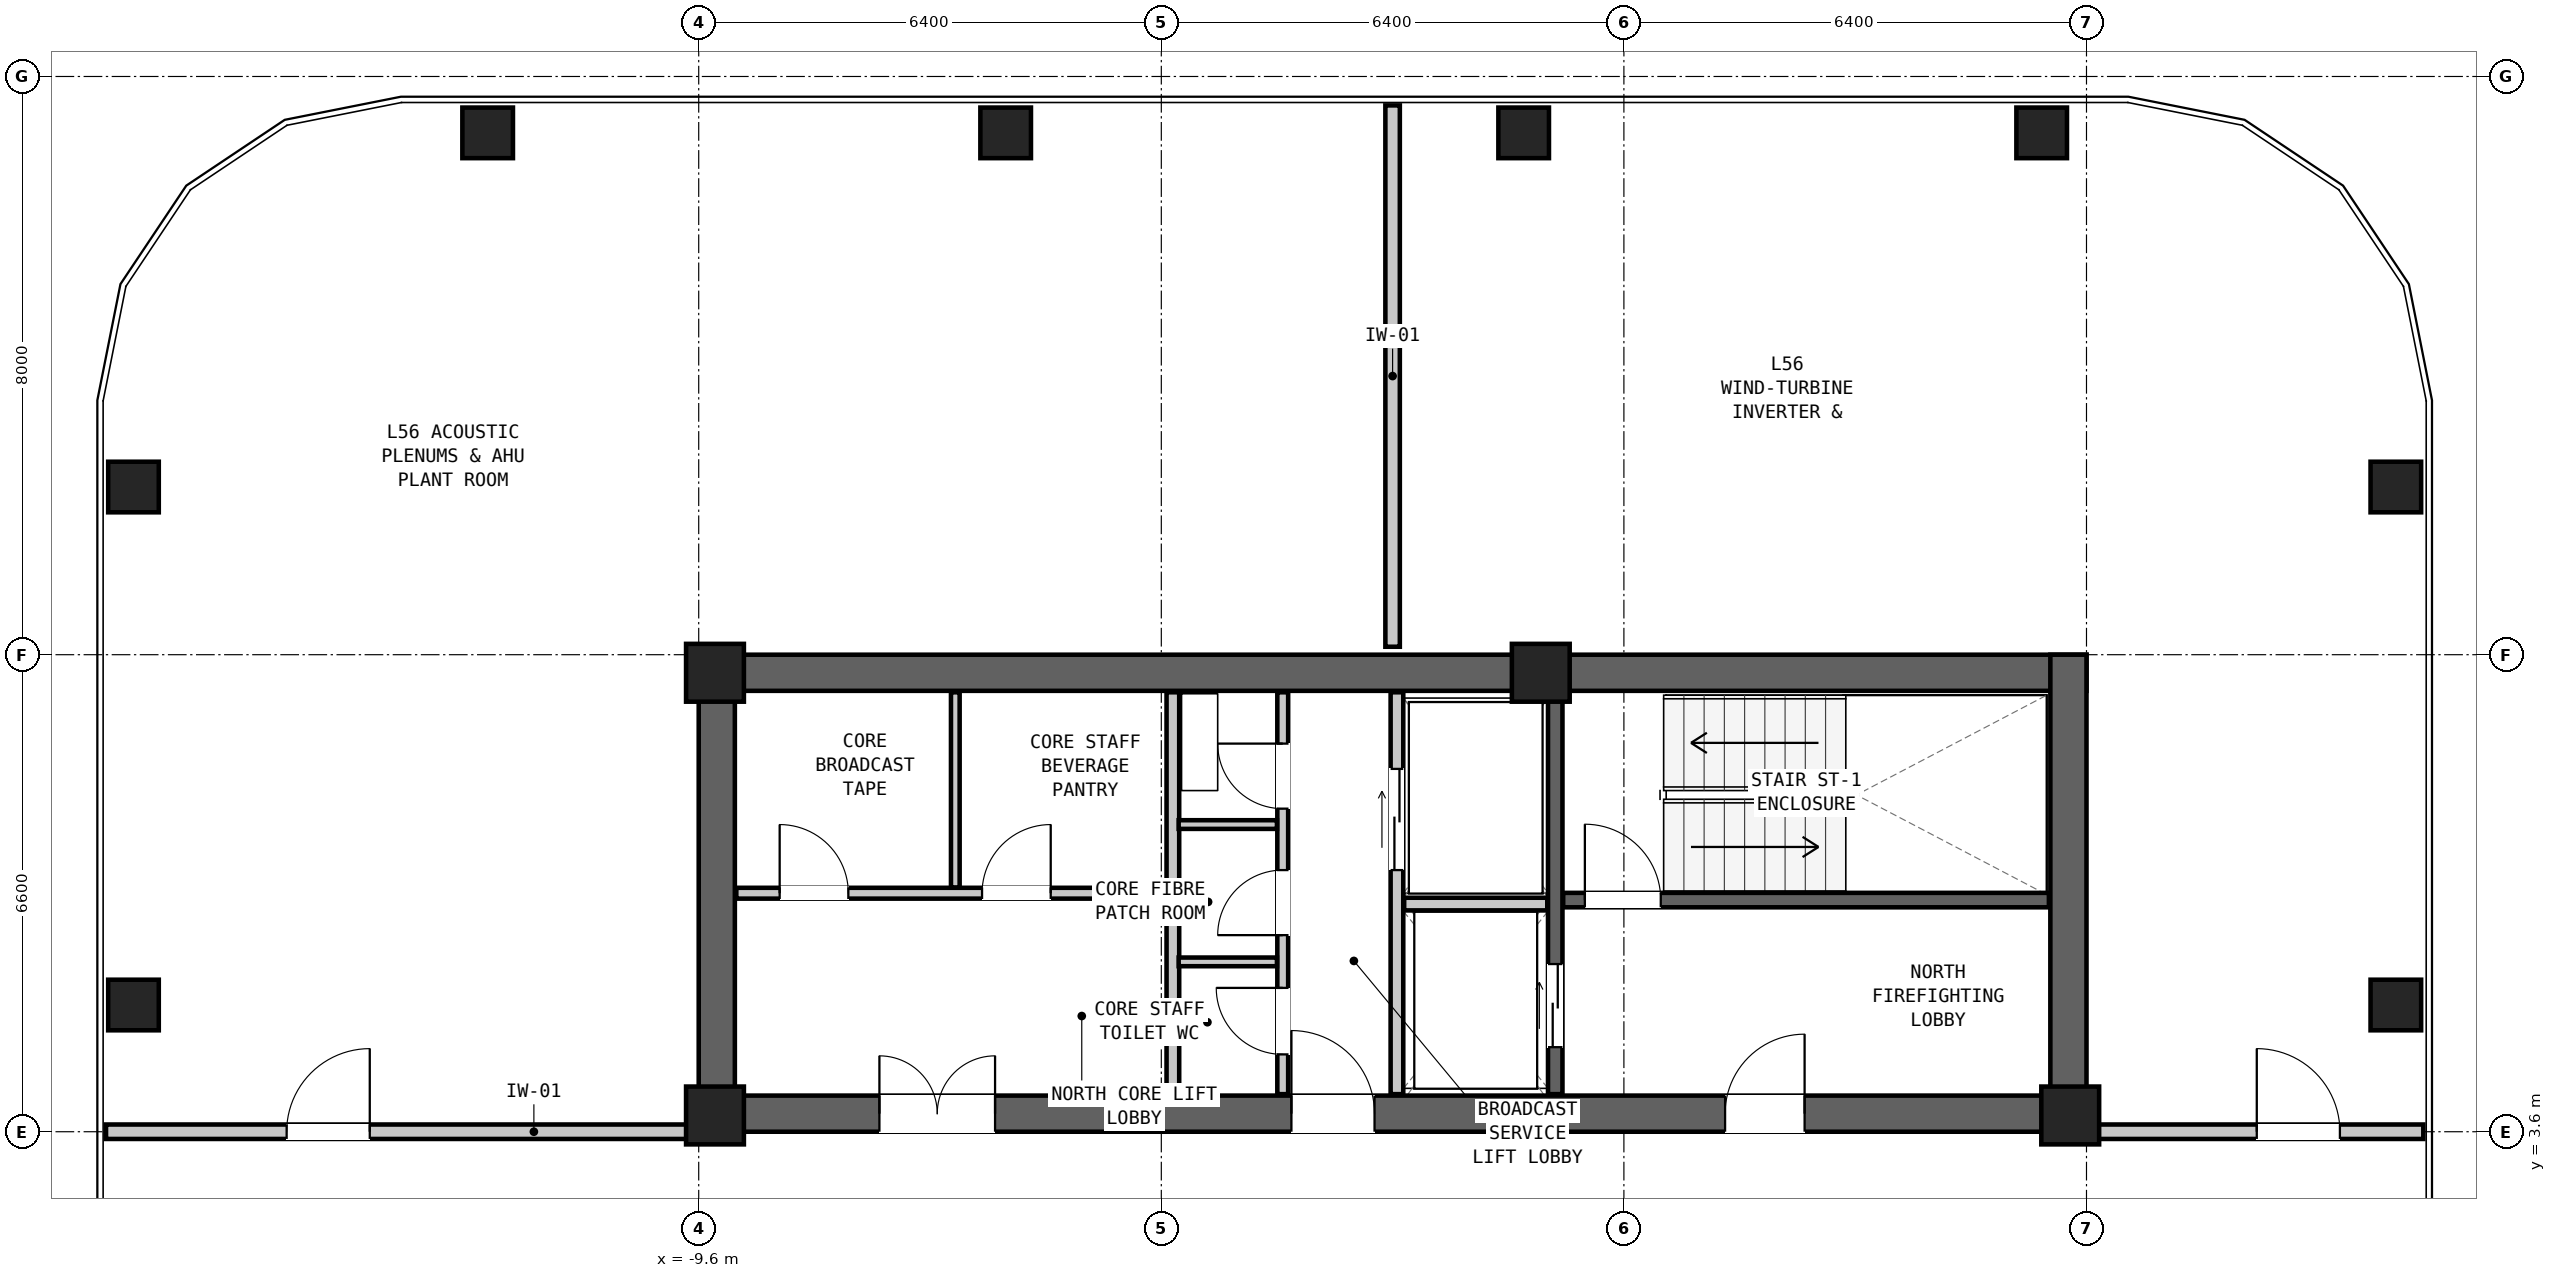
"""IFC4 building model, lengths in metres.
Left out: names, types, materials, properties, quantities, classifications, styles, units other than length and angle.
Written with IfcOpenShell. Run it as: python <this file> out.ifc"""

import sys

from ifc_helpers import new_model, si_unit, direction, frame, frame_2d, origin, origin_2d, place, context, subcontext, project, spatial, rectangle, hollow_rectangle, extrude, element, fill, save


model = new_model("IFC4")
c1 = context("Model", 3, precision=1e-05, world=origin(), true_north=direction((0.0, 1.0)))
c2 = subcontext(c1, "Body", "Model", "MODEL_VIEW")
j1 = project(units=[si_unit("LENGTHUNIT", "METRE"), si_unit("PLANEANGLEUNIT", "RADIAN")], contexts=[c1])
p1 = place(None, origin())
s1 = spatial("IfcSite", under=j1, at=p1, CompositionType="ELEMENT")
p2 = place(p1, origin())
s2 = spatial("IfcBuilding", under=s1, at=p2, CompositionType="ELEMENT")
p3 = place(p2, frame((0.0, 0.0, 191.55)))
s3 = spatial("IfcBuildingStorey", under=s2, at=p3, CompositionType="ELEMENT", Elevation=191.55)
p4 = place(p3, frame((-9.6, 9.95, 0.0), z_axis=(0.0, 0.0, 1.0), x_axis=(1.0, 0.0, 0.0)))
e1 = element("IfcWall", 1, at=p4, inside=s3, PredefinedType="SHEAR", context=c2, shape_type="SweptSolid", body=[
    extrude(rectangle(XDim=19.2, YDim=0.5, at=frame_2d((9.6, 0.0))), origin(), (0.0, 0.0, 1.0), 3.6),
])
p5 = place(p3, frame((-9.6, 3.85, 0.0), z_axis=(0.0, 0.0, 1.0), x_axis=(1.0, 0.0, 0.0)))
e2 = element("IfcWall", 2, at=p5, inside=s3, PredefinedType="SHEAR", context=c2, shape_type="SweptSolid", body=[
    extrude(rectangle(XDim=19.2, YDim=0.5, at=frame_2d((9.6, 0.0))), origin(), (0.0, 0.0, 1.0), 3.6),
])
p6 = place(p5, frame((14.2, 0.0, 0.0)))
e3 = element("IfcOpeningElement", 3, at=p6, cuts=e2, PredefinedType="OPENING", context=c2, shape_type="SweptSolid", body=[
    extrude(rectangle(XDim=1.1, YDim=2.08, at=frame_2d((0.55, 1.04))), frame((0.0, 0.262, 0.0), z_axis=(0.0, -1.0, 0.0), x_axis=(1.0, 0.0, 0.0)), (0.0, 0.0, 1.0), 0.524),
])
p7 = place(p5, frame((8.2, 0.0, 0.0)))
e4 = element("IfcOpeningElement", 4, at=p7, cuts=e2, PredefinedType="OPENING", context=c2, shape_type="SweptSolid", body=[
    extrude(rectangle(XDim=1.15, YDim=2.1, at=frame_2d((0.575, 1.05))), frame((0.0, 0.262, 0.0), z_axis=(0.0, -1.0, 0.0), x_axis=(1.0, 0.0, 0.0)), (0.0, 0.0, 1.0), 0.524),
])
p8 = place(p5, frame((2.5, 0.0, 0.0)))
e5 = element("IfcOpeningElement", 5, at=p8, cuts=e2, PredefinedType="OPENING", context=c2, shape_type="SweptSolid", body=[
    extrude(rectangle(XDim=1.6, YDim=2.12, at=frame_2d((0.8, 1.06))), frame((0.0, 0.262, 0.0), z_axis=(0.0, -1.0, 0.0), x_axis=(1.0, 0.0, 0.0)), (0.0, 0.0, 1.0), 0.524),
])
for number, where, z_axis, x_axis in (
    (6, (-9.35, 3.6, 0.0), (0.0, 0.0, 1.0), (0.0, 1.0, 0.0)),
    (7, (9.35, 3.6, 0.0), (0.0, 0.0, 1.0), (0.0, 1.0, 0.0)),
):
    element("IfcWall", number, at=place(p3, frame(where, z_axis=z_axis, x_axis=x_axis)), inside=s3, PredefinedType="SHEAR", context=c2, shape_type="SweptSolid", body=[
        extrude(rectangle(XDim=6.6, YDim=0.5, at=frame_2d((3.3, 0.0))), origin(), (0.0, 0.0, 1.0), 3.6),
    ])
for number, where, z_axis, x_axis in (
    (8, (13.88, 5.353, 0.0), (0.0, 0.0, 1.0), (0.0, 1.0, 0.0)),
    (9, (13.88, 12.52, 0.0), (0.0, 0.0, 1.0), (0.0, 1.0, 0.0)),
    (10, (8.98, 17.42, 0.0), (0.0, 0.0, 1.0), (1.0, 0.0, 0.0)),
    (11, (1.813, 17.42, 0.0), (0.0, 0.0, 1.0), (1.0, 0.0, 0.0)),
    (12, (-5.353, 17.42, 0.0), (0.0, 0.0, 1.0), (1.0, 0.0, 0.0)),
    (13, (-12.52, 17.42, 0.0), (0.0, 0.0, 1.0), (1.0, 0.0, 0.0)),
    (14, (-17.42, 12.52, 0.0), (0.0, 0.0, 1.0), (0.0, 1.0, 0.0)),
    (15, (-17.42, 5.353, 0.0), (0.0, 0.0, 1.0), (0.0, 1.0, 0.0)),
):
    element("IfcColumn", number, at=place(p3, frame(where, z_axis=z_axis, x_axis=x_axis)), inside=s3, PredefinedType="COLUMN", context=c2, shape_type="SweptSolid", body=[
        extrude(hollow_rectangle(XDim=0.7, YDim=0.7, WallThickness=0.045, at=origin_2d()), origin(), (0.0, 0.0, 1.0), 3.6),
    ])
for number, where, z_axis, x_axis in (
    (16, (-9.375, 9.95, 0.0), (0.0, 0.0, 1.0), (1.0, 0.0, 0.0)),
    (17, (2.05, 9.95, 0.0), (0.0, 0.0, 1.0), (1.0, 0.0, 0.0)),
    (18, (-9.375, 3.825, 0.0), (0.0, 0.0, 1.0), (1.0, 0.0, 0.0)),
    (19, (9.375, 3.825, 0.0), (0.0, 0.0, 1.0), (1.0, 0.0, 0.0)),
):
    element("IfcColumn", number, at=place(p3, frame(where, z_axis=z_axis, x_axis=x_axis)), inside=s3, PredefinedType="COLUMN", context=c2, shape_type="SweptSolid", body=[
        extrude(rectangle(XDim=0.8, YDim=0.8, at=origin_2d()), origin(), (0.0, 0.0, 1.0), 3.6),
    ])
p9 = place(p3, frame((2.36, 6.805, 0.0), z_axis=(0.0, 0.0, 1.0), x_axis=(1.0, 0.0, 0.0)))
e20 = element("IfcWall", 20, at=p9, inside=s3, PredefinedType="SHEAR", context=c2, shape_type="SweptSolid", body=[
    extrude(rectangle(XDim=6.72, YDim=0.2, at=frame_2d((3.36, 0.0))), origin(), (0.0, 0.0, 1.0), 3.22),
])
p10 = place(p9, frame((0.3, 0.0, 0.0)))
e21 = element("IfcOpeningElement", 21, at=p10, cuts=e20, PredefinedType="OPENING", context=c2, shape_type="SweptSolid", body=[
    extrude(rectangle(XDim=1.05, YDim=2.08, at=frame_2d((0.525, 1.04))), frame((0.0, 0.112, 0.0), z_axis=(0.0, -1.0, 0.0), x_axis=(1.0, 0.0, 0.0)), (0.0, 0.0, 1.0), 0.224),
])
p11 = place(p3, frame((2.25, 4.12, 0.0), z_axis=(0.0, 0.0, 1.0), x_axis=(0.0, 1.0, 0.0)))
e22 = element("IfcWall", 22, at=p11, inside=s3, PredefinedType="SHEAR", context=c2, shape_type="SweptSolid", body=[
    extrude(rectangle(XDim=5.56, YDim=0.2, at=frame_2d((2.78, 0.0))), origin(), (0.0, 0.0, 1.0), 3.22),
])
p12 = place(p11, frame((0.65, 0.0, 0.0)))
e23 = element("IfcOpeningElement", 23, at=p12, cuts=e22, PredefinedType="OPENING", context=c2, shape_type="SweptSolid", body=[
    extrude(rectangle(XDim=1.15, YDim=2.08, at=frame_2d((0.575, 1.04))), frame((0.0, 0.112, 0.0), z_axis=(0.0, -1.0, 0.0), x_axis=(1.0, 0.0, 0.0)), (0.0, 0.0, 1.0), 0.224),
])
p13 = place(p3, frame((0.06, 4.12, 0.0), z_axis=(0.0, 0.0, 1.0), x_axis=(0.0, 1.0, 0.0)))
e24 = element("IfcWall", 24, at=p13, inside=s3, PredefinedType="PARTITIONING", context=c2, shape_type="SweptSolid", body=[
    extrude(rectangle(XDim=5.56, YDim=0.175, at=frame_2d((2.78, 0.0))), origin(), (0.0, 0.0, 1.0), 3.22),
])
p14 = place(p13, frame((3.1, 0.0, 0.0)))
e25 = element("IfcOpeningElement", 25, at=p14, cuts=e24, PredefinedType="OPENING", context=c2, shape_type="SweptSolid", body=[
    extrude(rectangle(XDim=1.4, YDim=2.12, at=frame_2d((0.7, 1.06))), frame((0.0, 0.1, 0.0), z_axis=(0.0, -1.0, 0.0), x_axis=(1.0, 0.0, 0.0)), (0.0, 0.0, 1.0), 0.199),
])
p15 = place(p3, frame((0.16, 6.75, 0.0), z_axis=(0.0, 0.0, 1.0), x_axis=(1.0, 0.0, 0.0)))
e26 = element("IfcWall", 26, at=p15, inside=s3, PredefinedType="PARTITIONING", context=c2, shape_type="SweptSolid", body=[
    extrude(rectangle(XDim=1.98, YDim=0.175, at=frame_2d((0.99, 0.0))), origin(), (0.0, 0.0, 1.0), 3.22),
])
p16 = place(p3, frame((-3.04, 4.12, 0.0), z_axis=(0.0, 0.0, 1.0), x_axis=(0.0, 1.0, 0.0)))
e27 = element("IfcWall", 27, at=p16, inside=s3, PredefinedType="PARTITIONING", context=c2, shape_type="SweptSolid", body=[
    extrude(rectangle(XDim=5.56, YDim=0.175, at=frame_2d((2.78, 0.0))), origin(), (0.0, 0.0, 1.0), 3.22),
])
p17 = place(p3, frame((-1.52, 4.12, 0.0), z_axis=(0.0, 0.0, 1.0), x_axis=(0.0, 1.0, 0.0)))
e28 = element("IfcWall", 28, at=p17, inside=s3, PredefinedType="PARTITIONING", context=c2, shape_type="SweptSolid", body=[
    extrude(rectangle(XDim=5.56, YDim=0.15, at=frame_2d((2.78, 0.0))), origin(), (0.0, 0.0, 1.0), 3.22),
])
p18 = place(p17, frame((3.95, 0.0, 0.0)))
e29 = element("IfcOpeningElement", 29, at=p18, cuts=e28, PredefinedType="OPENING", context=c2, shape_type="SweptSolid", body=[
    extrude(rectangle(XDim=0.9, YDim=2.05, at=frame_2d((0.45, 1.025))), frame((0.0, 0.087, 0.0), z_axis=(0.0, -1.0, 0.0), x_axis=(1.0, 0.0, 0.0)), (0.0, 0.0, 1.0), 0.174),
])
p19 = place(p17, frame((2.2, 0.0, 0.0)))
e30 = element("IfcOpeningElement", 30, at=p19, cuts=e28, PredefinedType="OPENING", context=c2, shape_type="SweptSolid", body=[
    extrude(rectangle(XDim=0.9, YDim=2.05, at=frame_2d((0.45, 1.025))), frame((0.0, 0.087, 0.0), z_axis=(0.0, -1.0, 0.0), x_axis=(1.0, 0.0, 0.0)), (0.0, 0.0, 1.0), 0.174),
])
p20 = place(p17, frame((0.55, 0.0, 0.0)))
e31 = element("IfcOpeningElement", 31, at=p20, cuts=e28, PredefinedType="OPENING", context=c2, shape_type="SweptSolid", body=[
    extrude(rectangle(XDim=0.92, YDim=2.1, at=frame_2d((0.46, 1.05))), frame((0.0, 0.087, 0.0), z_axis=(0.0, -1.0, 0.0), x_axis=(1.0, 0.0, 0.0)), (0.0, 0.0, 1.0), 0.174),
])
for number, where, z_axis, x_axis in (
    (32, (-2.96, 5.95, 0.0), (0.0, 0.0, 1.0), (1.0, 0.0, 0.0)),
    (33, (-2.96, 7.85, 0.0), (0.0, 0.0, 1.0), (1.0, 0.0, 0.0)),
):
    element("IfcWall", number, at=place(p3, frame(where, z_axis=z_axis, x_axis=x_axis)), inside=s3, PredefinedType="PARTITIONING", context=c2, shape_type="SweptSolid", body=[
        extrude(rectangle(XDim=1.36, YDim=0.12, at=frame_2d((0.68, 0.0))), origin(), (0.0, 0.0, 1.0), 3.22),
    ])
p21 = place(p3, frame((-9.08, 6.9, 0.0), z_axis=(0.0, 0.0, 1.0), x_axis=(1.0, 0.0, 0.0)))
e34 = element("IfcWall", 34, at=p21, inside=s3, PredefinedType="PARTITIONING", context=c2, shape_type="SweptSolid", body=[
    extrude(rectangle(XDim=5.96, YDim=0.15, at=frame_2d((2.98, 0.0))), origin(), (0.0, 0.0, 1.0), 3.22),
])
p22 = place(p21, frame((0.6, 0.0, 0.0)))
e35 = element("IfcOpeningElement", 35, at=p22, cuts=e34, PredefinedType="OPENING", context=c2, shape_type="SweptSolid", body=[
    extrude(rectangle(XDim=0.95, YDim=2.1, at=frame_2d((0.475, 1.05))), frame((0.0, 0.087, 0.0), z_axis=(0.0, -1.0, 0.0), x_axis=(1.0, 0.0, 0.0)), (0.0, 0.0, 1.0), 0.174),
])
p23 = place(p21, frame((3.4, 0.0, 0.0)))
e36 = element("IfcOpeningElement", 36, at=p23, cuts=e34, PredefinedType="OPENING", context=c2, shape_type="SweptSolid", body=[
    extrude(rectangle(XDim=0.95, YDim=2.1, at=frame_2d((0.475, 1.05))), frame((0.0, 0.087, 0.0), z_axis=(0.0, -1.0, 0.0), x_axis=(1.0, 0.0, 0.0)), (0.0, 0.0, 1.0), 0.174),
])
p24 = place(p3, frame((-6.05, 6.98, 0.0), z_axis=(0.0, 0.0, 1.0), x_axis=(0.0, 1.0, 0.0)))
e37 = element("IfcWall", 37, at=p24, inside=s3, PredefinedType="PARTITIONING", context=c2, shape_type="SweptSolid", body=[
    extrude(rectangle(XDim=2.7, YDim=0.12, at=frame_2d((1.35, 0.0))), origin(), (0.0, 0.0, 1.0), 3.22),
])
p25 = place(p3, frame((-17.8, 3.6, 0.0), z_axis=(0.0, 0.0, 1.0), x_axis=(1.0, 0.0, 0.0)))
e38 = element("IfcWall", 38, at=p25, inside=s3, PredefinedType="PARTITIONING", context=c2, shape_type="SweptSolid", body=[
    extrude(rectangle(XDim=8.09, YDim=0.2, at=frame_2d((4.045, 0.0))), origin(), (0.0, 0.0, 1.0), 2.42),
])
p26 = place(p25, frame((2.499, 0.0, 0.0)))
e39 = element("IfcOpeningElement", 39, at=p26, cuts=e38, PredefinedType="OPENING", context=c2, shape_type="SweptSolid", body=[
    extrude(rectangle(XDim=1.15, YDim=2.1, at=frame_2d((0.575, 1.05))), frame((0.0, 0.112, 0.0), z_axis=(0.0, -1.0, 0.0), x_axis=(1.0, 0.0, 0.0)), (0.0, 0.0, 1.0), 0.224),
])
p27 = place(p3, frame((9.71, 3.6, 0.0), z_axis=(0.0, 0.0, 1.0), x_axis=(1.0, 0.0, 0.0)))
e40 = element("IfcWall", 40, at=p27, inside=s3, PredefinedType="PARTITIONING", context=c2, shape_type="SweptSolid", body=[
    extrude(rectangle(XDim=4.55, YDim=0.2, at=frame_2d((2.275, 0.0))), origin(), (0.0, 0.0, 1.0), 2.42),
])
p28 = place(p27, frame((2.246, 0.0, 0.0)))
e41 = element("IfcOpeningElement", 41, at=p28, cuts=e40, PredefinedType="OPENING", context=c2, shape_type="SweptSolid", body=[
    extrude(rectangle(XDim=1.15, YDim=2.1, at=frame_2d((0.575, 1.05))), frame((0.0, 0.112, 0.0), z_axis=(0.0, -1.0, 0.0), x_axis=(1.0, 0.0, 0.0)), (0.0, 0.0, 1.0), 0.224),
])
p29 = place(p3, frame((0.0, 10.31, 0.0), z_axis=(0.0, 0.0, 1.0), x_axis=(0.0, 1.0, 0.0)))
e42 = element("IfcWall", 42, at=p29, inside=s3, PredefinedType="PARTITIONING", context=c2, shape_type="SweptSolid", body=[
    extrude(rectangle(XDim=7.49, YDim=0.2, at=frame_2d((3.745, 0.0))), origin(), (0.0, 0.0, 1.0), 2.438),
])
p30 = place(p10, origin())
e43 = element("IfcDoor", 43, at=p30, inside=s3, OperationType="SINGLE_SWING_LEFT", PredefinedType="DOOR", context=c2, shape_type="SweptSolid", body=[
    extrude(rectangle(XDim=1.05, YDim=2.08, at=frame_2d((0.525, 1.04))), frame((0.0, 0.025, 0.0), z_axis=(0.0, -1.0, 0.0), x_axis=(1.0, 0.0, 0.0)), (0.0, 0.0, 1.0), 0.05),
])
fill(e21, e43)
p31 = place(p6, origin())
e44 = element("IfcDoor", 44, at=p31, inside=s3, OperationType="SINGLE_SWING_RIGHT", PredefinedType="DOOR", context=c2, shape_type="SweptSolid", body=[
    extrude(rectangle(XDim=1.1, YDim=2.08, at=frame_2d((0.55, 1.04))), frame((0.0, 0.025, 0.0), z_axis=(0.0, -1.0, 0.0), x_axis=(1.0, 0.0, 0.0)), (0.0, 0.0, 1.0), 0.05),
])
fill(e3, e44)
p32 = place(p12, origin())
e45 = element("IfcDoor", 45, at=p32, inside=s3, OperationType="DOUBLE_DOOR_SLIDING", PredefinedType="DOOR", context=c2, shape_type="SweptSolid", body=[
    extrude(rectangle(XDim=1.15, YDim=2.08, at=frame_2d((0.575, 1.04))), frame((0.0, 0.025, 0.0), z_axis=(0.0, -1.0, 0.0), x_axis=(1.0, 0.0, 0.0)), (0.0, 0.0, 1.0), 0.05),
])
fill(e23, e45)
p33 = place(p14, origin())
e46 = element("IfcDoor", 46, at=p33, inside=s3, OperationType="DOUBLE_DOOR_SLIDING", PredefinedType="DOOR", context=c2, shape_type="SweptSolid", body=[
    extrude(rectangle(XDim=1.4, YDim=2.12, at=frame_2d((0.7, 1.06))), frame((0.0, 0.025, 0.0), z_axis=(0.0, -1.0, 0.0), x_axis=(1.0, 0.0, 0.0)), (0.0, 0.0, 1.0), 0.05),
])
fill(e25, e46)
p34 = place(p7, origin())
e47 = element("IfcDoor", 47, at=p34, inside=s3, OperationType="SINGLE_SWING_LEFT", PredefinedType="DOOR", context=c2, shape_type="SweptSolid", body=[
    extrude(rectangle(XDim=1.15, YDim=2.1, at=frame_2d((0.575, 1.05))), frame((0.0, 0.025, 0.0), z_axis=(0.0, -1.0, 0.0), x_axis=(1.0, 0.0, 0.0)), (0.0, 0.0, 1.0), 0.05),
])
fill(e4, e47)
p35 = place(p18, origin())
e48 = element("IfcDoor", 48, at=p35, inside=s3, OperationType="SINGLE_SWING_RIGHT", PredefinedType="DOOR", context=c2, shape_type="SweptSolid", body=[
    extrude(rectangle(XDim=0.9, YDim=2.05, at=frame_2d((0.45, 1.025))), frame((0.0, 0.025, 0.0), z_axis=(0.0, -1.0, 0.0), x_axis=(1.0, 0.0, 0.0)), (0.0, 0.0, 1.0), 0.05),
])
fill(e29, e48)
p36 = place(p19, origin())
e49 = element("IfcDoor", 49, at=p36, inside=s3, OperationType="SINGLE_SWING_LEFT", PredefinedType="DOOR", context=c2, shape_type="SweptSolid", body=[
    extrude(rectangle(XDim=0.9, YDim=2.05, at=frame_2d((0.45, 1.025))), frame((0.0, 0.025, 0.0), z_axis=(0.0, -1.0, 0.0), x_axis=(1.0, 0.0, 0.0)), (0.0, 0.0, 1.0), 0.05),
])
fill(e30, e49)
p37 = place(p20, origin())
e50 = element("IfcDoor", 50, at=p37, inside=s3, OperationType="SINGLE_SWING_RIGHT", PredefinedType="DOOR", context=c2, shape_type="SweptSolid", body=[
    extrude(rectangle(XDim=0.92, YDim=2.1, at=frame_2d((0.46, 1.05))), frame((0.0, 0.025, 0.0), z_axis=(0.0, -1.0, 0.0), x_axis=(1.0, 0.0, 0.0)), (0.0, 0.0, 1.0), 0.05),
])
fill(e31, e50)
p38 = place(p8, origin())
e51 = element("IfcDoor", 51, at=p38, inside=s3, OperationType="DOUBLE_DOOR_SINGLE_SWING", PredefinedType="DOOR", context=c2, shape_type="SweptSolid", body=[
    extrude(rectangle(XDim=1.6, YDim=2.12, at=frame_2d((0.8, 1.06))), frame((0.0, 0.025, 0.0), z_axis=(0.0, -1.0, 0.0), x_axis=(1.0, 0.0, 0.0)), (0.0, 0.0, 1.0), 0.05),
])
fill(e5, e51)
p39 = place(p22, origin())
e52 = element("IfcDoor", 52, at=p39, inside=s3, OperationType="SINGLE_SWING_LEFT", PredefinedType="DOOR", context=c2, shape_type="SweptSolid", body=[
    extrude(rectangle(XDim=0.95, YDim=2.1, at=frame_2d((0.475, 1.05))), frame((0.0, 0.025, 0.0), z_axis=(0.0, -1.0, 0.0), x_axis=(1.0, 0.0, 0.0)), (0.0, 0.0, 1.0), 0.05),
])
fill(e35, e52)
p40 = place(p23, origin())
e53 = element("IfcDoor", 53, at=p40, inside=s3, OperationType="SINGLE_SWING_RIGHT", PredefinedType="DOOR", context=c2, shape_type="SweptSolid", body=[
    extrude(rectangle(XDim=0.95, YDim=2.1, at=frame_2d((0.475, 1.05))), frame((0.0, 0.025, 0.0), z_axis=(0.0, -1.0, 0.0), x_axis=(1.0, 0.0, 0.0)), (0.0, 0.0, 1.0), 0.05),
])
fill(e36, e53)
p41 = place(p26, origin())
e54 = element("IfcDoor", 54, at=p41, inside=s3, OperationType="SINGLE_SWING_RIGHT", PredefinedType="DOOR", context=c2, shape_type="SweptSolid", body=[
    extrude(rectangle(XDim=1.15, YDim=2.1, at=frame_2d((0.575, 1.05))), frame((0.0, 0.025, 0.0), z_axis=(0.0, -1.0, 0.0), x_axis=(1.0, 0.0, 0.0)), (0.0, 0.0, 1.0), 0.05),
])
fill(e39, e54)
p42 = place(p28, origin())
e55 = element("IfcDoor", 55, at=p42, inside=s3, OperationType="SINGLE_SWING_LEFT", PredefinedType="DOOR", context=c2, shape_type="SweptSolid", body=[
    extrude(rectangle(XDim=1.15, YDim=2.1, at=frame_2d((0.575, 1.05))), frame((0.0, 0.025, 0.0), z_axis=(0.0, -1.0, 0.0), x_axis=(1.0, 0.0, 0.0)), (0.0, 0.0, 1.0), 0.05),
])
fill(e41, e55)
save(model, sys.argv[1])
